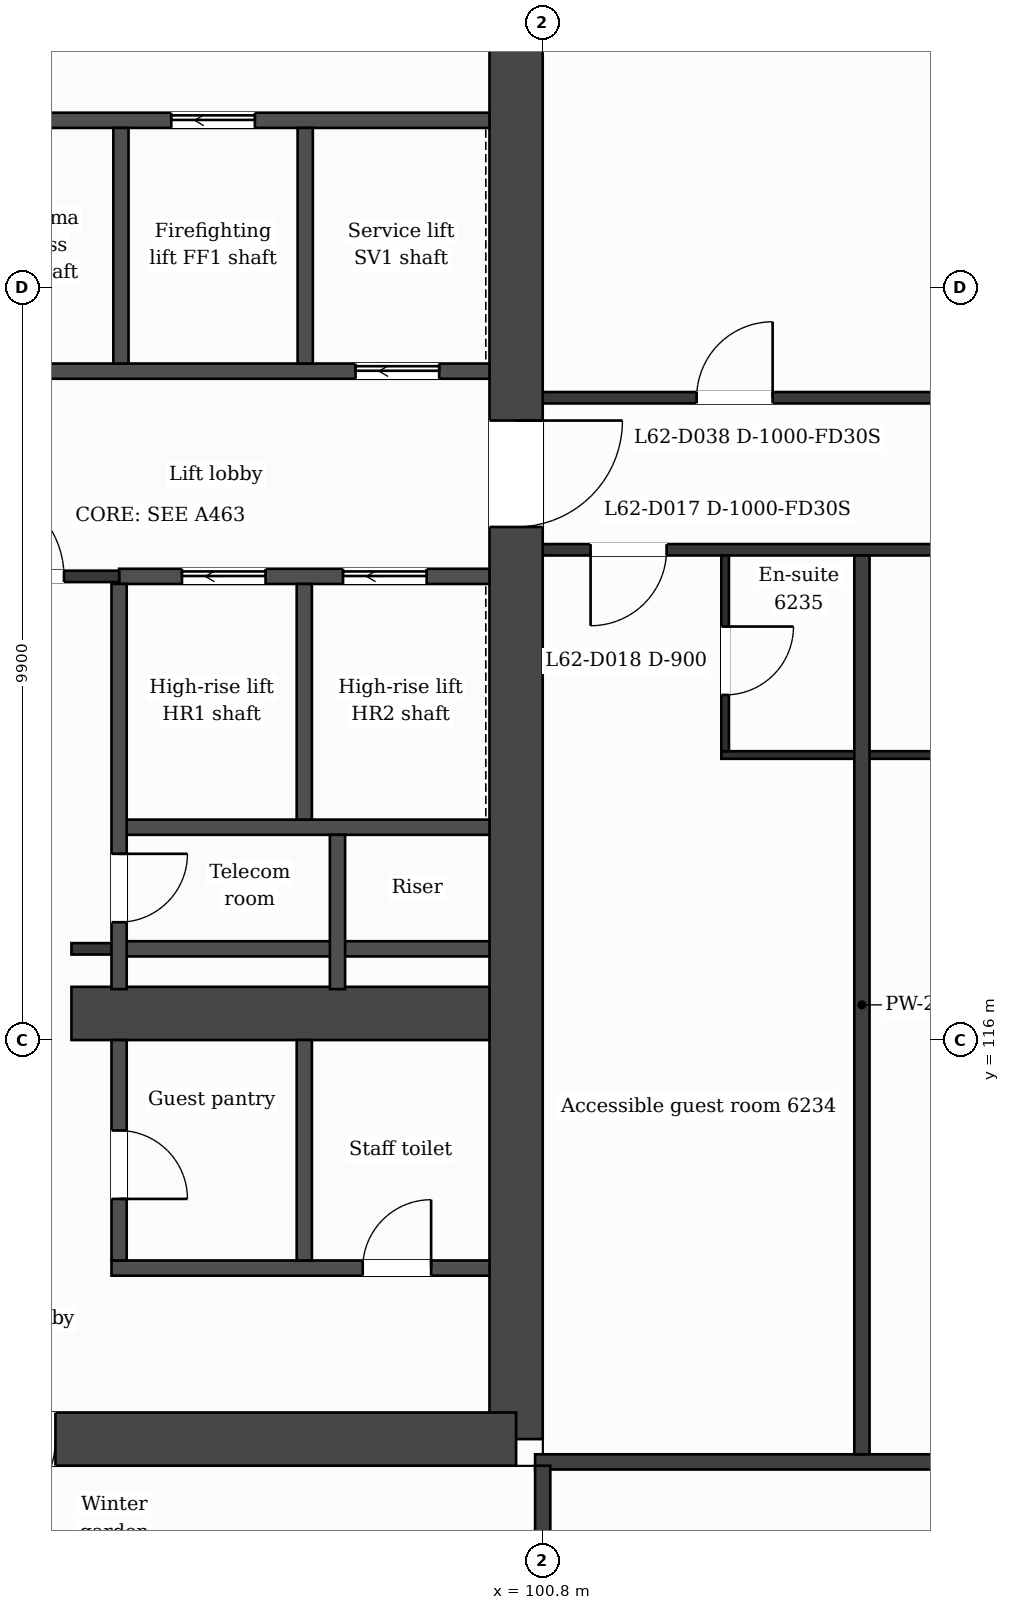
"""IFC4 building model, lengths in metres.
Left out: names, types, materials, properties, quantities, classifications, styles, units other than length and angle.
Written with IfcOpenShell. Run it as: python <this file> out.ifc"""

import sys

from ifc_helpers import new_model, si_unit, direction, frame, frame_2d, origin, place, context, subcontext, project, spatial, rectangle, extrude, element, fill, save


model = new_model("IFC4")
c1 = context("Model", 3, precision=1e-05, world=origin(), true_north=direction((0.0, 1.0)))
c2 = subcontext(c1, "Body", "Model", "MODEL_VIEW")
j1 = project(units=[si_unit("LENGTHUNIT", "METRE"), si_unit("PLANEANGLEUNIT", "RADIAN")], contexts=[c1])
p1 = place(None, origin())
s1 = spatial("IfcSite", under=j1, at=p1, CompositionType="ELEMENT")
p2 = place(p1, origin())
s2 = spatial("IfcBuilding", under=s1, at=p2, CompositionType="ELEMENT")
p3 = place(p2, frame((0.0, 0.0, 259.0)))
s3 = spatial("IfcBuildingStorey", under=s2, at=p3, CompositionType="ELEMENT", Elevation=259.0)
p4 = place(p3, frame((100.45, 132.05, 0.0), z_axis=(0.0, 0.0, 1.0), x_axis=(0.0, -1.0, 0.0)))
e1 = element("IfcWall", 1, at=p4, inside=s3, PredefinedType="SHEAR", context=c2, shape_type="SweptSolid", body=[
    extrude(rectangle(XDim=21.3, YDim=0.7, at=frame_2d((10.65, 0.0))), origin(), (0.0, 0.0, 1.0), 3.7),
])
p5 = place(p4, frame((7.9, 0.0, 0.0)))
e2 = element("IfcOpeningElement", 2, at=p5, cuts=e1, PredefinedType="OPENING", context=c2, shape_type="SweptSolid", body=[
    extrude(rectangle(XDim=1.4, YDim=2.1, at=frame_2d((0.7, 1.05))), frame((0.0, 0.36, 0.0), z_axis=(0.0, -1.0, 0.0), x_axis=(1.0, 0.0, 0.0)), (0.0, 0.0, 1.0), 0.72),
])
p6 = place(p3, frame((100.45, 110.75, 0.0), z_axis=(0.0, 0.0, 1.0), x_axis=(-1.0, 0.0, 0.0)))
e3 = element("IfcWall", 3, at=p6, inside=s3, PredefinedType="SHEAR", context=c2, shape_type="SweptSolid", body=[
    extrude(rectangle(XDim=14.38, YDim=0.7, at=frame_2d((7.19, 0.0))), origin(), (0.0, 0.0, 1.0), 3.7),
])
p7 = place(p6, frame((6.06, 0.0, 0.0)))
e4 = element("IfcOpeningElement", 4, at=p7, cuts=e3, PredefinedType="OPENING", context=c2, shape_type="SweptSolid", body=[
    extrude(rectangle(XDim=1.2, YDim=2.1, at=frame_2d((0.6, 1.05))), frame((0.0, 0.36, 0.0), z_axis=(0.0, -1.0, 0.0), x_axis=(1.0, 0.0, 0.0)), (0.0, 0.0, 1.0), 0.72),
])
p8 = place(p3, frame((94.6, 116.35, 0.0), z_axis=(0.0, 0.0, 1.0), x_axis=(1.0, 0.0, 0.0)))
e5 = element("IfcWall", 5, at=p8, inside=s3, PredefinedType="SHEAR", context=c2, shape_type="SweptSolid", body=[
    extrude(rectangle(XDim=5.5, YDim=0.7, at=frame_2d((2.75, 0.0))), origin(), (0.0, 0.0, 1.0), 3.7),
])
p9 = place(p3, frame((100.7, 110.45, 0.0), z_axis=(0.0, 0.0, 1.0), x_axis=(1.0, 0.0, 0.0)))
e6 = element("IfcWall", 6, at=p9, inside=s3, PredefinedType="PARTITIONING", context=c2, shape_type="SweptSolid", body=[
    extrude(rectangle(XDim=25.4, YDim=0.2, at=frame_2d((12.7, 0.0))), origin(), (0.0, 0.0, 1.0), 3.38),
])
p10 = place(p3, frame((95.127, 113.0, 0.0), z_axis=(0.0, 0.0, 1.0), x_axis=(1.0, 0.0, 0.0)))
e7 = element("IfcWall", 7, at=p10, inside=s3, PredefinedType="PARTITIONING", context=c2, shape_type="SweptSolid", body=[
    extrude(rectangle(XDim=4.973, YDim=0.2, at=frame_2d((2.487, 0.0))), origin(), (0.0, 0.0, 1.0), 3.38),
])
p11 = place(p10, frame((3.305, 0.0, 0.0)))
e8 = element("IfcOpeningElement", 8, at=p11, cuts=e7, PredefinedType="OPENING", context=c2, shape_type="SweptSolid", body=[
    extrude(rectangle(XDim=0.9, YDim=2.1, at=frame_2d((0.45, 1.05))), frame((0.0, 0.11, 0.0), z_axis=(0.0, -1.0, 0.0), x_axis=(1.0, 0.0, 0.0)), (0.0, 0.0, 1.0), 0.22),
])
p12 = place(p3, frame((95.227, 117.2, 0.0), z_axis=(0.0, 0.0, 1.0), x_axis=(1.0, 0.0, 0.0)))
e9 = element("IfcWall", 9, at=p12, inside=s3, PredefinedType="PARTITIONING", context=c2, shape_type="SweptSolid", body=[
    extrude(rectangle(XDim=4.873, YDim=0.2, at=frame_2d((2.437, 0.0))), origin(), (0.0, 0.0, 1.0), 3.38),
])
p13 = place(p3, frame((94.6, 117.2, 0.0), z_axis=(0.0, 0.0, 1.0), x_axis=(1.0, 0.0, 0.0)))
e10 = element("IfcWall", 10, at=p13, inside=s3, PredefinedType="PARTITIONING", context=c2, shape_type="SweptSolid", body=[
    extrude(rectangle(XDim=0.627, YDim=0.15, at=frame_2d((0.313, 0.0))), origin(), (0.0, 0.0, 1.0), 3.38),
])
p14 = place(p3, frame((95.227, 118.8, 0.0), z_axis=(0.0, 0.0, 1.0), x_axis=(1.0, 0.0, 0.0)))
e11 = element("IfcWall", 11, at=p14, inside=s3, PredefinedType="PARTITIONING", context=c2, shape_type="SweptSolid", body=[
    extrude(rectangle(XDim=4.873, YDim=0.2, at=frame_2d((2.437, 0.0))), origin(), (0.0, 0.0, 1.0), 3.38),
])
p15 = place(p3, frame((103.15, 119.75, 0.0), z_axis=(0.0, 0.0, 1.0), x_axis=(1.0, 0.0, 0.0)))
e12 = element("IfcWall", 12, at=p15, inside=s3, PredefinedType="PARTITIONING", context=c2, shape_type="SweptSolid", body=[
    extrude(rectangle(XDim=4.0, YDim=0.1, at=frame_2d((2.0, 0.0))), origin(), (0.0, 0.0, 1.0), 3.38),
])
p16 = place(p3, frame((95.227, 122.1, 0.0), z_axis=(0.0, 0.0, 1.0), x_axis=(1.0, 0.0, 0.0)))
e13 = element("IfcWall", 13, at=p16, inside=s3, PredefinedType="PARTITIONING", context=c2, shape_type="SweptSolid", body=[
    extrude(rectangle(XDim=4.873, YDim=0.2, at=frame_2d((2.437, 0.0))), origin(), (0.0, 0.0, 1.0), 3.38),
])
p17 = place(p16, frame((0.827, 0.0, 0.0)))
e14 = element("IfcOpeningElement", 14, at=p17, cuts=e13, PredefinedType="OPENING", context=c2, shape_type="SweptSolid", body=[
    extrude(rectangle(XDim=1.1, YDim=2.1, at=frame_2d((0.55, 1.05))), frame((0.0, 0.11, 0.0), z_axis=(0.0, -1.0, 0.0), x_axis=(1.0, 0.0, 0.0)), (0.0, 0.0, 1.0), 0.22),
])
p18 = place(p16, frame((2.946, 0.0, 0.0)))
e15 = element("IfcOpeningElement", 15, at=p18, cuts=e13, PredefinedType="OPENING", context=c2, shape_type="SweptSolid", body=[
    extrude(rectangle(XDim=1.1, YDim=2.1, at=frame_2d((0.55, 1.05))), frame((0.0, 0.11, 0.0), z_axis=(0.0, -1.0, 0.0), x_axis=(1.0, 0.0, 0.0)), (0.0, 0.0, 1.0), 0.22),
])
p19 = place(p3, frame((92.827, 122.1, 0.0), z_axis=(0.0, 0.0, 1.0), x_axis=(1.0, 0.0, 0.0)))
e16 = element("IfcWall", 16, at=p19, inside=s3, PredefinedType="PARTITIONING", context=c2, shape_type="SweptSolid", body=[
    extrude(rectangle(XDim=2.4, YDim=0.15, at=frame_2d((1.2, 0.0))), origin(), (0.0, 0.0, 1.0), 3.38),
])
p20 = place(p19, frame((0.475, 0.0, 0.0)))
e17 = element("IfcOpeningElement", 17, at=p20, cuts=e16, PredefinedType="OPENING", context=c2, shape_type="SweptSolid", body=[
    extrude(rectangle(XDim=1.2, YDim=2.1, at=frame_2d((0.6, 1.05))), frame((0.0, 0.085, 0.0), z_axis=(0.0, -1.0, 0.0), x_axis=(1.0, 0.0, 0.0)), (0.0, 0.0, 1.0), 0.17),
])
p21 = place(p3, frame((100.8, 122.45, 0.0), z_axis=(0.0, 0.0, 1.0), x_axis=(1.0, 0.0, 0.0)))
e18 = element("IfcWall", 18, at=p21, inside=s3, PredefinedType="PARTITIONING", context=c2, shape_type="SweptSolid", body=[
    extrude(rectangle(XDim=25.2, YDim=0.15, at=frame_2d((12.6, 0.0))), origin(), (0.0, 0.0, 1.0), 3.38),
])
p22 = place(p21, frame((0.63, 0.0, 0.0)))
e19 = element("IfcOpeningElement", 19, at=p22, cuts=e18, PredefinedType="OPENING", context=c2, shape_type="SweptSolid", body=[
    extrude(rectangle(XDim=1.0, YDim=2.1, at=frame_2d((0.5, 1.05))), frame((0.0, 0.085, 0.0), z_axis=(0.0, -1.0, 0.0), x_axis=(1.0, 0.0, 0.0)), (0.0, 0.0, 1.0), 0.17),
])
p23 = place(p21, frame((6.875, 0.0, 0.0)))
e20 = element("IfcOpeningElement", 20, at=p23, cuts=e18, PredefinedType="OPENING", context=c2, shape_type="SweptSolid", body=[
    extrude(rectangle(XDim=0.95, YDim=2.1, at=frame_2d((0.475, 1.05))), frame((0.0, 0.085, 0.0), z_axis=(0.0, -1.0, 0.0), x_axis=(1.0, 0.0, 0.0)), (0.0, 0.0, 1.0), 0.17),
])
p24 = place(p21, frame((8.925, 0.0, 0.0)))
e21 = element("IfcOpeningElement", 21, at=p24, cuts=e18, PredefinedType="OPENING", context=c2, shape_type="SweptSolid", body=[
    extrude(rectangle(XDim=1.0, YDim=2.1, at=frame_2d((0.5, 1.05))), frame((0.0, 0.085, 0.0), z_axis=(0.0, -1.0, 0.0), x_axis=(1.0, 0.0, 0.0)), (0.0, 0.0, 1.0), 0.17),
])
p25 = place(p21, frame((20.5, 0.0, 0.0)))
e22 = element("IfcOpeningElement", 22, at=p25, cuts=e18, PredefinedType="OPENING", context=c2, shape_type="SweptSolid", body=[
    extrude(rectangle(XDim=1.0, YDim=2.1, at=frame_2d((0.5, 1.05))), frame((0.0, 0.085, 0.0), z_axis=(0.0, -1.0, 0.0), x_axis=(1.0, 0.0, 0.0)), (0.0, 0.0, 1.0), 0.17),
])
p26 = place(p3, frame((100.8, 124.45, 0.0), z_axis=(0.0, 0.0, 1.0), x_axis=(1.0, 0.0, 0.0)))
e23 = element("IfcWall", 23, at=p26, inside=s3, PredefinedType="PARTITIONING", context=c2, shape_type="SweptSolid", body=[
    extrude(rectangle(XDim=25.2, YDim=0.15, at=frame_2d((12.6, 0.0))), origin(), (0.0, 0.0, 1.0), 3.38),
])
p27 = place(p26, frame((2.025, 0.0, 0.0)))
e24 = element("IfcOpeningElement", 24, at=p27, cuts=e23, PredefinedType="OPENING", context=c2, shape_type="SweptSolid", body=[
    extrude(rectangle(XDim=1.0, YDim=2.1, at=frame_2d((0.5, 1.05))), frame((0.0, 0.085, 0.0), z_axis=(0.0, -1.0, 0.0), x_axis=(1.0, 0.0, 0.0)), (0.0, 0.0, 1.0), 0.17),
])
p28 = place(p26, frame((9.27, 0.0, 0.0)))
e25 = element("IfcOpeningElement", 25, at=p28, cuts=e23, PredefinedType="OPENING", context=c2, shape_type="SweptSolid", body=[
    extrude(rectangle(XDim=1.0, YDim=2.1, at=frame_2d((0.5, 1.05))), frame((0.0, 0.085, 0.0), z_axis=(0.0, -1.0, 0.0), x_axis=(1.0, 0.0, 0.0)), (0.0, 0.0, 1.0), 0.17),
])
p29 = place(p26, frame((13.575, 0.0, 0.0)))
e26 = element("IfcOpeningElement", 26, at=p29, cuts=e23, PredefinedType="OPENING", context=c2, shape_type="SweptSolid", body=[
    extrude(rectangle(XDim=1.0, YDim=2.1, at=frame_2d((0.5, 1.05))), frame((0.0, 0.085, 0.0), z_axis=(0.0, -1.0, 0.0), x_axis=(1.0, 0.0, 0.0)), (0.0, 0.0, 1.0), 0.17),
])
p30 = place(p26, frame((21.17, 0.0, 0.0)))
e27 = element("IfcOpeningElement", 27, at=p30, cuts=e23, PredefinedType="OPENING", context=c2, shape_type="SweptSolid", body=[
    extrude(rectangle(XDim=1.0, YDim=2.1, at=frame_2d((0.5, 1.05))), frame((0.0, 0.085, 0.0), z_axis=(0.0, -1.0, 0.0), x_axis=(1.0, 0.0, 0.0)), (0.0, 0.0, 1.0), 0.17),
])
p31 = place(p3, frame((92.702, 124.8, 0.0), z_axis=(0.0, 0.0, 1.0), x_axis=(1.0, 0.0, 0.0)))
e28 = element("IfcWall", 28, at=p31, inside=s3, PredefinedType="PARTITIONING", context=c2, shape_type="SweptSolid", body=[
    extrude(rectangle(XDim=7.398, YDim=0.2, at=frame_2d((3.699, 0.0))), origin(), (0.0, 0.0, 1.0), 3.38),
])
p32 = place(p31, frame((5.636, 0.0, 0.0)))
e29 = element("IfcOpeningElement", 29, at=p32, cuts=e28, PredefinedType="OPENING", context=c2, shape_type="SweptSolid", body=[
    extrude(rectangle(XDim=1.1, YDim=2.1, at=frame_2d((0.55, 1.05))), frame((0.0, 0.11, 0.0), z_axis=(0.0, -1.0, 0.0), x_axis=(1.0, 0.0, 0.0)), (0.0, 0.0, 1.0), 0.22),
])
p33 = place(p3, frame((92.827, 128.1, 0.0), z_axis=(0.0, 0.0, 1.0), x_axis=(1.0, 0.0, 0.0)))
e30 = element("IfcWall", 30, at=p33, inside=s3, PredefinedType="PARTITIONING", context=c2, shape_type="SweptSolid", body=[
    extrude(rectangle(XDim=7.273, YDim=0.2, at=frame_2d((3.637, 0.0))), origin(), (0.0, 0.0, 1.0), 3.38),
])
p34 = place(p33, frame((3.086, 0.0, 0.0)))
e31 = element("IfcOpeningElement", 31, at=p34, cuts=e30, PredefinedType="OPENING", context=c2, shape_type="SweptSolid", body=[
    extrude(rectangle(XDim=1.1, YDim=2.1, at=frame_2d((0.55, 1.05))), frame((0.0, 0.11, 0.0), z_axis=(0.0, -1.0, 0.0), x_axis=(1.0, 0.0, 0.0)), (0.0, 0.0, 1.0), 0.22),
])
p35 = place(p3, frame((95.227, 113.1, 0.0), z_axis=(0.0, 0.0, 1.0), x_axis=(0.0, 1.0, 0.0)))
e32 = element("IfcWall", 32, at=p35, inside=s3, PredefinedType="PARTITIONING", context=c2, shape_type="SweptSolid", body=[
    extrude(rectangle(XDim=2.9, YDim=0.2, at=frame_2d((1.45, 0.0))), origin(), (0.0, 0.0, 1.0), 3.38),
])
p36 = place(p35, frame((0.81, 0.0, 0.0)))
e33 = element("IfcOpeningElement", 33, at=p36, cuts=e32, PredefinedType="OPENING", context=c2, shape_type="SweptSolid", body=[
    extrude(rectangle(XDim=0.9, YDim=2.1, at=frame_2d((0.45, 1.05))), frame((0.0, 0.11, 0.0), z_axis=(0.0, -1.0, 0.0), x_axis=(1.0, 0.0, 0.0)), (0.0, 0.0, 1.0), 0.22),
])
p37 = place(p3, frame((95.227, 116.67, 0.0), z_axis=(0.0, 0.0, 1.0), x_axis=(0.0, 1.0, 0.0)))
e34 = element("IfcWall", 34, at=p37, inside=s3, PredefinedType="PARTITIONING", context=c2, shape_type="SweptSolid", body=[
    extrude(rectangle(XDim=5.33, YDim=0.2, at=frame_2d((2.665, 0.0))), origin(), (0.0, 0.0, 1.0), 3.38),
])
p38 = place(p37, frame((0.88, 0.0, 0.0)))
e35 = element("IfcOpeningElement", 35, at=p38, cuts=e34, PredefinedType="OPENING", context=c2, shape_type="SweptSolid", body=[
    extrude(rectangle(XDim=0.9, YDim=2.1, at=frame_2d((0.45, 1.05))), frame((0.0, 0.11, 0.0), z_axis=(0.0, -1.0, 0.0), x_axis=(1.0, 0.0, 0.0)), (0.0, 0.0, 1.0), 0.22),
])
p39 = place(p3, frame((95.251, 124.9, 0.0), z_axis=(0.0, 0.0, 1.0), x_axis=(0.0, 1.0, 0.0)))
e36 = element("IfcWall", 36, at=p39, inside=s3, PredefinedType="PARTITIONING", context=c2, shape_type="SweptSolid", body=[
    extrude(rectangle(XDim=3.1, YDim=0.2, at=frame_2d((1.55, 0.0))), origin(), (0.0, 0.0, 1.0), 3.38),
])
p40 = place(p3, frame((97.664, 113.1, 0.0), z_axis=(0.0, 0.0, 1.0), x_axis=(0.0, 1.0, 0.0)))
e37 = element("IfcWall", 37, at=p40, inside=s3, PredefinedType="PARTITIONING", context=c2, shape_type="SweptSolid", body=[
    extrude(rectangle(XDim=2.9, YDim=0.2, at=frame_2d((1.45, 0.0))), origin(), (0.0, 0.0, 1.0), 3.38),
])
for number, where, z_axis, x_axis in (
    (38, (97.664, 118.9, 0.0), (0.0, 0.0, 1.0), (0.0, 1.0, 0.0)),
    (39, (97.676, 124.9, 0.0), (0.0, 0.0, 1.0), (0.0, 1.0, 0.0)),
):
    element("IfcWall", number, at=place(p3, frame(where, z_axis=z_axis, x_axis=x_axis)), inside=s3, PredefinedType="PARTITIONING", context=c2, shape_type="SweptSolid", body=[
        extrude(rectangle(XDim=3.1, YDim=0.2, at=frame_2d((1.55, 0.0))), origin(), (0.0, 0.0, 1.0), 3.38),
    ])
p41 = place(p3, frame((98.1, 116.67, 0.0), z_axis=(0.0, 0.0, 1.0), x_axis=(0.0, 1.0, 0.0)))
e40 = element("IfcWall", 40, at=p41, inside=s3, PredefinedType="PARTITIONING", context=c2, shape_type="SweptSolid", body=[
    extrude(rectangle(XDim=2.03, YDim=0.2, at=frame_2d((1.015, 0.0))), origin(), (0.0, 0.0, 1.0), 3.38),
])
p42 = place(p3, frame((100.8, 108.79, 0.0), z_axis=(0.0, 0.0, 1.0), x_axis=(0.0, 1.0, 0.0)))
e41 = element("IfcWall", 41, at=p42, inside=s3, PredefinedType="PARTITIONING", context=c2, shape_type="SweptSolid", body=[
    extrude(rectangle(XDim=1.61, YDim=0.2, at=frame_2d((0.805, 0.0))), origin(), (0.0, 0.0, 1.0), 3.38),
])
p43 = place(p3, frame((103.2, 119.8, 0.0), z_axis=(0.0, 0.0, 1.0), x_axis=(0.0, 1.0, 0.0)))
e42 = element("IfcWall", 42, at=p43, inside=s3, PredefinedType="PARTITIONING", context=c2, shape_type="SweptSolid", body=[
    extrude(rectangle(XDim=2.575, YDim=0.1, at=frame_2d((1.288, 0.0))), origin(), (0.0, 0.0, 1.0), 3.38),
])
p44 = place(p43, frame((0.74, 0.0, 0.0)))
e43 = element("IfcOpeningElement", 43, at=p44, cuts=e42, PredefinedType="OPENING", context=c2, shape_type="SweptSolid", body=[
    extrude(rectangle(XDim=0.9, YDim=2.1, at=frame_2d((0.45, 1.05))), frame((0.0, 0.06, 0.0), z_axis=(0.0, -1.0, 0.0), x_axis=(1.0, 0.0, 0.0)), (0.0, 0.0, 1.0), 0.12),
])
p45 = place(p3, frame((105.0, 110.55, 0.0), z_axis=(0.0, 0.0, 1.0), x_axis=(0.0, 1.0, 0.0)))
e44 = element("IfcWall", 44, at=p45, inside=s3, PredefinedType="PARTITIONING", context=c2, shape_type="SweptSolid", body=[
    extrude(rectangle(XDim=11.825, YDim=0.2, at=frame_2d((5.913, 0.0))), origin(), (0.0, 0.0, 1.0), 3.38),
])
p46 = place(p20, origin())
e45 = element("IfcDoor", 45, at=p46, inside=s3, OperationType="SINGLE_SWING_LEFT", PredefinedType="DOOR", context=c2, shape_type="SweptSolid", body=[
    extrude(rectangle(XDim=1.2, YDim=2.1, at=frame_2d((0.6, 1.05))), frame((0.0, 0.025, 0.0), z_axis=(0.0, -1.0, 0.0), x_axis=(1.0, 0.0, 0.0)), (0.0, 0.0, 1.0), 0.05),
])
fill(e17, e45)
p47 = place(p17, origin())
e46 = element("IfcDoor", 46, at=p47, inside=s3, OperationType="SLIDING_TO_LEFT", PredefinedType="DOOR", context=c2, shape_type="SweptSolid", body=[
    extrude(rectangle(XDim=1.1, YDim=2.1, at=frame_2d((0.55, 1.05))), frame((0.0, 0.025, 0.0), z_axis=(0.0, -1.0, 0.0), x_axis=(1.0, 0.0, 0.0)), (0.0, 0.0, 1.0), 0.05),
])
fill(e14, e46)
p48 = place(p18, origin())
e47 = element("IfcDoor", 47, at=p48, inside=s3, OperationType="SLIDING_TO_LEFT", PredefinedType="DOOR", context=c2, shape_type="SweptSolid", body=[
    extrude(rectangle(XDim=1.1, YDim=2.1, at=frame_2d((0.55, 1.05))), frame((0.0, 0.025, 0.0), z_axis=(0.0, -1.0, 0.0), x_axis=(1.0, 0.0, 0.0)), (0.0, 0.0, 1.0), 0.05),
])
fill(e15, e47)
p49 = place(p34, origin())
e48 = element("IfcDoor", 48, at=p49, inside=s3, OperationType="SLIDING_TO_LEFT", PredefinedType="DOOR", context=c2, shape_type="SweptSolid", body=[
    extrude(rectangle(XDim=1.1, YDim=2.1, at=frame_2d((0.55, 1.05))), frame((0.0, 0.025, 0.0), z_axis=(0.0, -1.0, 0.0), x_axis=(1.0, 0.0, 0.0)), (0.0, 0.0, 1.0), 0.05),
])
fill(e31, e48)
p50 = place(p32, origin())
e49 = element("IfcDoor", 49, at=p50, inside=s3, OperationType="SLIDING_TO_LEFT", PredefinedType="DOOR", context=c2, shape_type="SweptSolid", body=[
    extrude(rectangle(XDim=1.1, YDim=2.1, at=frame_2d((0.55, 1.05))), frame((0.0, 0.025, 0.0), z_axis=(0.0, -1.0, 0.0), x_axis=(1.0, 0.0, 0.0)), (0.0, 0.0, 1.0), 0.05),
])
fill(e29, e49)
p51 = place(p38, origin())
e50 = element("IfcDoor", 50, at=p51, inside=s3, OperationType="SINGLE_SWING_RIGHT", PredefinedType="DOOR", context=c2, shape_type="SweptSolid", body=[
    extrude(rectangle(XDim=0.9, YDim=2.1, at=frame_2d((0.45, 1.05))), frame((0.0, 0.025, 0.0), z_axis=(0.0, -1.0, 0.0), x_axis=(1.0, 0.0, 0.0)), (0.0, 0.0, 1.0), 0.05),
])
fill(e35, e50)
p52 = place(p36, origin())
e51 = element("IfcDoor", 51, at=p52, inside=s3, OperationType="SINGLE_SWING_LEFT", PredefinedType="DOOR", context=c2, shape_type="SweptSolid", body=[
    extrude(rectangle(XDim=0.9, YDim=2.1, at=frame_2d((0.45, 1.05))), frame((0.0, 0.025, 0.0), z_axis=(0.0, -1.0, 0.0), x_axis=(1.0, 0.0, 0.0)), (0.0, 0.0, 1.0), 0.05),
])
fill(e33, e51)
p53 = place(p11, origin())
e52 = element("IfcDoor", 52, at=p53, inside=s3, OperationType="SINGLE_SWING_RIGHT", PredefinedType="DOOR", context=c2, shape_type="SweptSolid", body=[
    extrude(rectangle(XDim=0.9, YDim=2.1, at=frame_2d((0.45, 1.05))), frame((0.0, 0.025, 0.0), z_axis=(0.0, -1.0, 0.0), x_axis=(1.0, 0.0, 0.0)), (0.0, 0.0, 1.0), 0.05),
])
fill(e8, e52)
p54 = place(p22, origin())
e53 = element("IfcDoor", 53, at=p54, inside=s3, OperationType="SINGLE_SWING_LEFT", PredefinedType="DOOR", context=c2, shape_type="SweptSolid", body=[
    extrude(rectangle(XDim=1.0, YDim=2.1, at=frame_2d((0.5, 1.05))), frame((0.0, 0.025, 0.0), z_axis=(0.0, -1.0, 0.0), x_axis=(1.0, 0.0, 0.0)), (0.0, 0.0, 1.0), 0.05),
])
fill(e19, e53)
p55 = place(p44, origin())
e54 = element("IfcDoor", 54, at=p55, inside=s3, OperationType="SINGLE_SWING_RIGHT", PredefinedType="DOOR", context=c2, shape_type="SweptSolid", body=[
    extrude(rectangle(XDim=0.9, YDim=2.1, at=frame_2d((0.45, 1.05))), frame((0.0, 0.025, 0.0), z_axis=(0.0, -1.0, 0.0), x_axis=(1.0, 0.0, 0.0)), (0.0, 0.0, 1.0), 0.05),
])
fill(e43, e54)
p56 = place(p27, origin())
e55 = element("IfcDoor", 55, at=p56, inside=s3, OperationType="SINGLE_SWING_RIGHT", PredefinedType="DOOR", context=c2, shape_type="SweptSolid", body=[
    extrude(rectangle(XDim=1.0, YDim=2.1, at=frame_2d((0.5, 1.05))), frame((0.0, 0.025, 0.0), z_axis=(0.0, -1.0, 0.0), x_axis=(1.0, 0.0, 0.0)), (0.0, 0.0, 1.0), 0.05),
])
fill(e24, e55)
p57 = place(p7, origin())
e56 = element("IfcDoor", 56, at=p57, inside=s3, OperationType="SINGLE_SWING_RIGHT", PredefinedType="DOOR", context=c2, shape_type="SweptSolid", body=[
    extrude(rectangle(XDim=1.2, YDim=2.1, at=frame_2d((0.6, 1.05))), frame((0.0, 0.025, 0.0), z_axis=(0.0, -1.0, 0.0), x_axis=(1.0, 0.0, 0.0)), (0.0, 0.0, 1.0), 0.05),
])
fill(e4, e56)
p58 = place(p5, origin())
e57 = element("IfcDoor", 57, at=p58, inside=s3, OperationType="SINGLE_SWING_LEFT", PredefinedType="DOOR", context=c2, shape_type="SweptSolid", body=[
    extrude(rectangle(XDim=1.4, YDim=2.1, at=frame_2d((0.7, 1.05))), frame((0.0, 0.025, 0.0), z_axis=(0.0, -1.0, 0.0), x_axis=(1.0, 0.0, 0.0)), (0.0, 0.0, 1.0), 0.05),
])
fill(e2, e57)
save(model, sys.argv[1])
